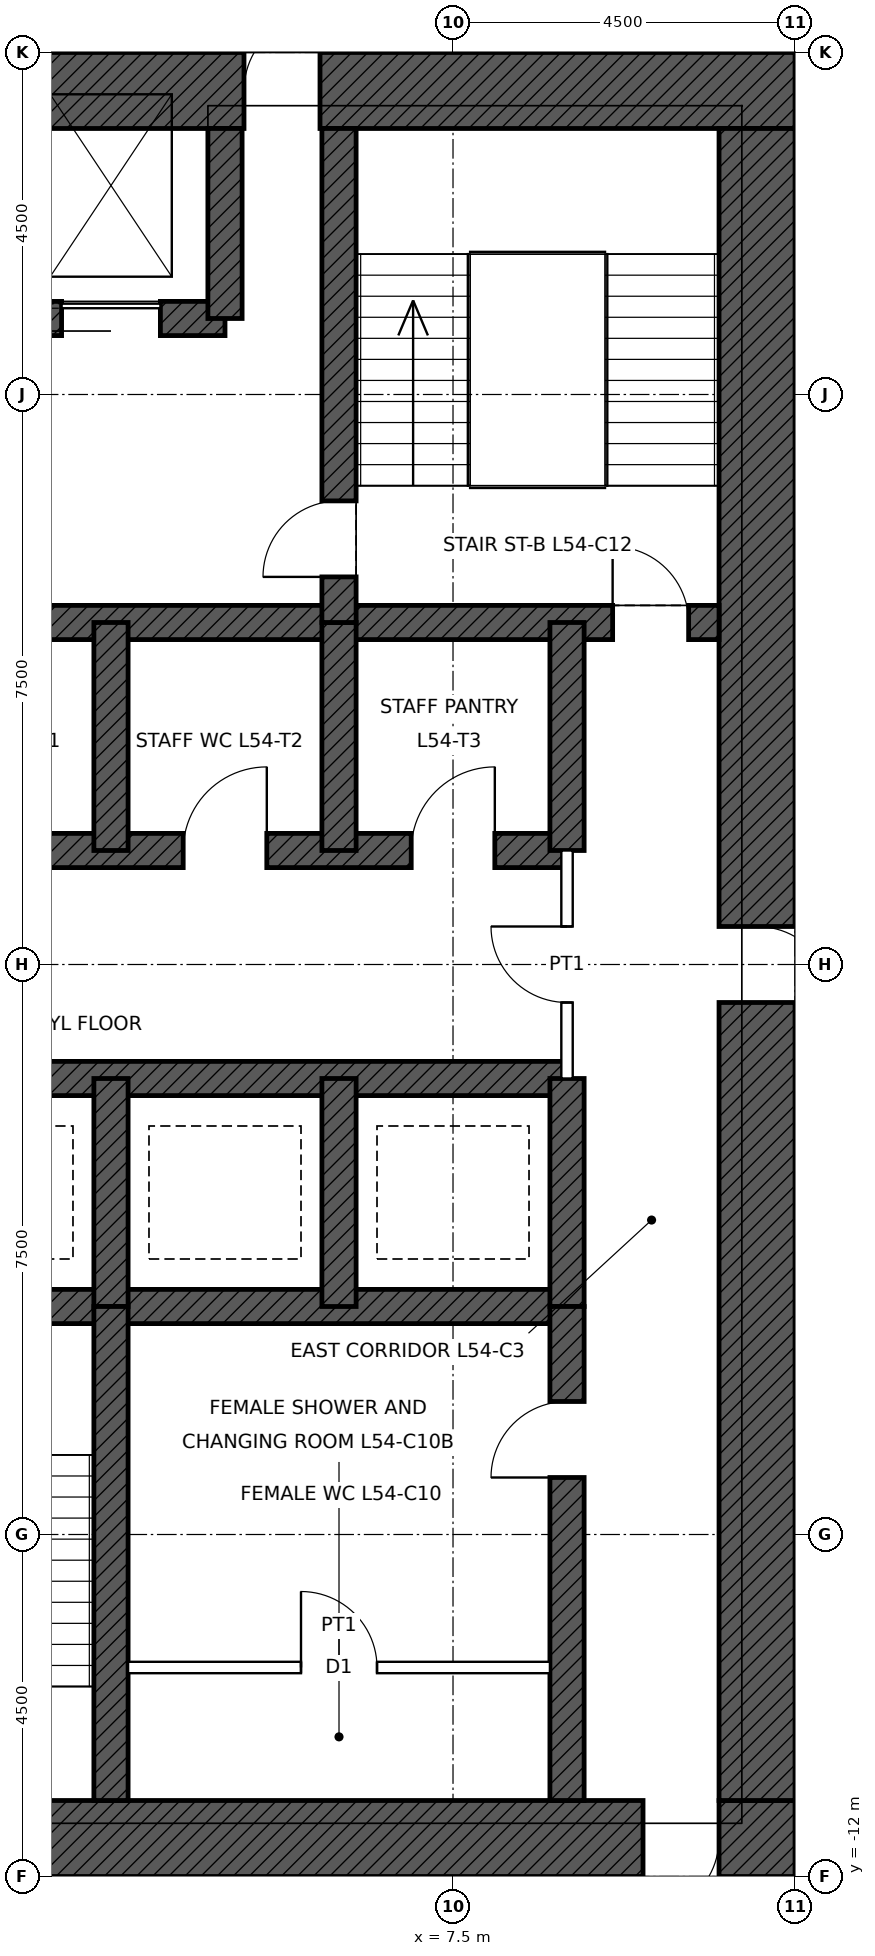
"""IFC4 building model, lengths in metres.
Left out: names, types, materials, properties, quantities, classifications, styles, units other than length and angle.
Written with IfcOpenShell. Run it as: python <this file> out.ifc"""

import sys

from ifc_helpers import new_model, si_unit, direction, frame, frame_2d, origin, place, context, subcontext, project, spatial, rectangle, extrude, element, fill, save


model = new_model("IFC4")
c1 = context("Model", 3, precision=1e-05, world=origin(), true_north=direction((0.0, 1.0)))
c2 = subcontext(c1, "Body", "Model", "MODEL_VIEW")
j1 = project(units=[si_unit("LENGTHUNIT", "METRE"), si_unit("PLANEANGLEUNIT", "RADIAN")], contexts=[c1])
p1 = place(None, origin())
s1 = spatial("IfcSite", under=j1, at=p1, CompositionType="ELEMENT")
p2 = place(p1, origin())
s2 = spatial("IfcBuilding", under=s1, at=p2, CompositionType="ELEMENT")
p3 = place(p2, frame((0.0, 0.0, 249.9)))
s3 = spatial("IfcBuildingStorey", under=s2, at=p3, CompositionType="ELEMENT", Elevation=249.9)
p4 = place(p3, frame((-12.0, 11.5, 0.0), z_axis=(0.0, 0.0, 1.0), x_axis=(1.0, 0.0, 0.0)))
e1 = element("IfcWall", 1, at=p4, inside=s3, PredefinedType="SHEAR", context=c2, shape_type="SweptSolid", body=[
    extrude(rectangle(XDim=24.0, YDim=1.0, at=frame_2d((12.0, 0.0))), origin(), (0.0, 0.0, 1.0), 4.0),
])
p5 = place(p4, frame((6.25, 0.0, 0.0)))
e2 = element("IfcOpeningElement", 2, at=p5, cuts=e1, PredefinedType="OPENING", context=c2, shape_type="SweptSolid", body=[
    extrude(rectangle(XDim=1.0, YDim=2.4, at=frame_2d((0.5, 1.2))), frame((0.0, 0.51, 0.0), z_axis=(0.0, -1.0, 0.0), x_axis=(1.0, 0.0, 0.0)), (0.0, 0.0, 1.0), 1.02),
])
p6 = place(p4, frame((16.75, 0.0, 0.0)))
e3 = element("IfcOpeningElement", 3, at=p6, cuts=e1, PredefinedType="OPENING", context=c2, shape_type="SweptSolid", body=[
    extrude(rectangle(XDim=1.0, YDim=2.4, at=frame_2d((0.5, 1.2))), frame((0.0, 0.51, 0.0), z_axis=(0.0, -1.0, 0.0), x_axis=(1.0, 0.0, 0.0)), (0.0, 0.0, 1.0), 1.02),
])
p7 = place(p3, frame((12.0, -11.5, 0.0), z_axis=(0.0, 0.0, 1.0), x_axis=(-1.0, 0.0, 0.0)))
e4 = element("IfcWall", 4, at=p7, inside=s3, PredefinedType="SHEAR", context=c2, shape_type="SweptSolid", body=[
    extrude(rectangle(XDim=24.0, YDim=1.0, at=frame_2d((12.0, 0.0))), origin(), (0.0, 0.0, 1.0), 4.0),
])
p8 = place(p7, frame((11.5, 0.0, 0.0)))
e5 = element("IfcOpeningElement", 5, at=p8, cuts=e4, PredefinedType="OPENING", context=c2, shape_type="SweptSolid", body=[
    extrude(rectangle(XDim=1.0, YDim=2.1, at=frame_2d((0.5, 1.05))), frame((0.0, 0.51, 0.0), z_axis=(0.0, -1.0, 0.0), x_axis=(1.0, 0.0, 0.0)), (0.0, 0.0, 1.0), 1.02),
])
p9 = place(p7, frame((1.0, 0.0, 0.0)))
e6 = element("IfcOpeningElement", 6, at=p9, cuts=e4, PredefinedType="OPENING", context=c2, shape_type="SweptSolid", body=[
    extrude(rectangle(XDim=1.0, YDim=2.4, at=frame_2d((0.5, 1.2))), frame((0.0, 0.51, 0.0), z_axis=(0.0, -1.0, 0.0), x_axis=(1.0, 0.0, 0.0)), (0.0, 0.0, 1.0), 1.02),
])
p10 = place(p3, frame((11.5, 11.0, 0.0), z_axis=(0.0, 0.0, 1.0), x_axis=(0.0, -1.0, 0.0)))
e7 = element("IfcWall", 7, at=p10, inside=s3, PredefinedType="SHEAR", context=c2, shape_type="SweptSolid", body=[
    extrude(rectangle(XDim=22.0, YDim=1.0, at=frame_2d((11.0, 0.0))), origin(), (0.0, 0.0, 1.0), 4.0),
])
p11 = place(p10, frame((10.5, 0.0, 0.0)))
e8 = element("IfcOpeningElement", 8, at=p11, cuts=e7, PredefinedType="OPENING", context=c2, shape_type="SweptSolid", body=[
    extrude(rectangle(XDim=1.0, YDim=2.4, at=frame_2d((0.5, 1.2))), frame((0.0, 0.51, 0.0), z_axis=(0.0, -1.0, 0.0), x_axis=(1.0, 0.0, 0.0)), (0.0, 0.0, 1.0), 1.02),
])
p12 = place(p3, frame((-11.0, 4.5, 0.0), z_axis=(0.0, 0.0, 1.0), x_axis=(1.0, 0.0, 0.0)))
e9 = element("IfcWall", 9, at=p12, inside=s3, PredefinedType="SHEAR", context=c2, shape_type="SweptSolid", body=[
    extrude(rectangle(XDim=22.0, YDim=0.45, at=frame_2d((11.0, 0.0))), origin(), (0.0, 0.0, 1.0), 4.0),
])
p13 = place(p12, frame((0.4, 0.0, 0.0)))
e10 = element("IfcOpeningElement", 10, at=p13, cuts=e9, PredefinedType="OPENING", context=c2, shape_type="SweptSolid", body=[
    extrude(rectangle(XDim=1.0, YDim=2.1, at=frame_2d((0.5, 1.05))), frame((0.0, 0.235, 0.0), z_axis=(0.0, -1.0, 0.0), x_axis=(1.0, 0.0, 0.0)), (0.0, 0.0, 1.0), 0.47),
])
p14 = place(p12, frame((20.6, 0.0, 0.0)))
e11 = element("IfcOpeningElement", 11, at=p14, cuts=e9, PredefinedType="OPENING", context=c2, shape_type="SweptSolid", body=[
    extrude(rectangle(XDim=1.0, YDim=2.1, at=frame_2d((0.5, 1.05))), frame((0.0, 0.235, 0.0), z_axis=(0.0, -1.0, 0.0), x_axis=(1.0, 0.0, 0.0)), (0.0, 0.0, 1.0), 0.47),
])
p15 = place(p3, frame((-9.0, 1.5, 0.0), z_axis=(0.0, 0.0, 1.0), x_axis=(1.0, 0.0, 0.0)))
e12 = element("IfcWall", 12, at=p15, inside=s3, PredefinedType="SHEAR", context=c2, shape_type="SweptSolid", body=[
    extrude(rectangle(XDim=18.0, YDim=0.45, at=frame_2d((9.0, 0.0))), origin(), (0.0, 0.0, 1.0), 4.0),
])
p16 = place(p15, frame((0.95, 0.0, 0.0)))
e13 = element("IfcOpeningElement", 13, at=p16, cuts=e12, PredefinedType="OPENING", context=c2, shape_type="SweptSolid", body=[
    extrude(rectangle(XDim=1.1, YDim=2.1, at=frame_2d((0.55, 1.05))), frame((0.0, 0.235, 0.0), z_axis=(0.0, -1.0, 0.0), x_axis=(1.0, 0.0, 0.0)), (0.0, 0.0, 1.0), 0.47),
])
p17 = place(p15, frame((3.95, 0.0, 0.0)))
e14 = element("IfcOpeningElement", 14, at=p17, cuts=e12, PredefinedType="OPENING", context=c2, shape_type="SweptSolid", body=[
    extrude(rectangle(XDim=1.1, YDim=2.1, at=frame_2d((0.55, 1.05))), frame((0.0, 0.235, 0.0), z_axis=(0.0, -1.0, 0.0), x_axis=(1.0, 0.0, 0.0)), (0.0, 0.0, 1.0), 0.47),
])
p18 = place(p15, frame((6.95, 0.0, 0.0)))
e15 = element("IfcOpeningElement", 15, at=p18, cuts=e12, PredefinedType="OPENING", context=c2, shape_type="SweptSolid", body=[
    extrude(rectangle(XDim=1.1, YDim=2.1, at=frame_2d((0.55, 1.05))), frame((0.0, 0.235, 0.0), z_axis=(0.0, -1.0, 0.0), x_axis=(1.0, 0.0, 0.0)), (0.0, 0.0, 1.0), 0.47),
])
p19 = place(p15, frame((9.95, 0.0, 0.0)))
e16 = element("IfcOpeningElement", 16, at=p19, cuts=e12, PredefinedType="OPENING", context=c2, shape_type="SweptSolid", body=[
    extrude(rectangle(XDim=1.1, YDim=2.1, at=frame_2d((0.55, 1.05))), frame((0.0, 0.235, 0.0), z_axis=(0.0, -1.0, 0.0), x_axis=(1.0, 0.0, 0.0)), (0.0, 0.0, 1.0), 0.47),
])
p20 = place(p15, frame((12.95, 0.0, 0.0)))
e17 = element("IfcOpeningElement", 17, at=p20, cuts=e12, PredefinedType="OPENING", context=c2, shape_type="SweptSolid", body=[
    extrude(rectangle(XDim=1.1, YDim=2.1, at=frame_2d((0.55, 1.05))), frame((0.0, 0.235, 0.0), z_axis=(0.0, -1.0, 0.0), x_axis=(1.0, 0.0, 0.0)), (0.0, 0.0, 1.0), 0.47),
])
p21 = place(p15, frame((15.95, 0.0, 0.0)))
e18 = element("IfcOpeningElement", 18, at=p21, cuts=e12, PredefinedType="OPENING", context=c2, shape_type="SweptSolid", body=[
    extrude(rectangle(XDim=1.1, YDim=2.1, at=frame_2d((0.55, 1.05))), frame((0.0, 0.235, 0.0), z_axis=(0.0, -1.0, 0.0), x_axis=(1.0, 0.0, 0.0)), (0.0, 0.0, 1.0), 0.47),
])
p22 = place(p3, frame((-9.0, -1.5, 0.0), z_axis=(0.0, 0.0, 1.0), x_axis=(1.0, 0.0, 0.0)))
e19 = element("IfcWall", 19, at=p22, inside=s3, PredefinedType="SHEAR", context=c2, shape_type="SweptSolid", body=[
    extrude(rectangle(XDim=18.0, YDim=0.45, at=frame_2d((9.0, 0.0))), origin(), (0.0, 0.0, 1.0), 4.0),
])
p23 = place(p22, frame((0.95, 0.0, 0.0)))
e20 = element("IfcOpeningElement", 20, at=p23, cuts=e19, PredefinedType="OPENING", context=c2, shape_type="SweptSolid", body=[
    extrude(rectangle(XDim=1.1, YDim=2.1, at=frame_2d((0.55, 1.05))), frame((0.0, 0.235, 0.0), z_axis=(0.0, -1.0, 0.0), x_axis=(1.0, 0.0, 0.0)), (0.0, 0.0, 1.0), 0.47),
])
p24 = place(p22, frame((3.95, 0.0, 0.0)))
e21 = element("IfcOpeningElement", 21, at=p24, cuts=e19, PredefinedType="OPENING", context=c2, shape_type="SweptSolid", body=[
    extrude(rectangle(XDim=1.1, YDim=2.1, at=frame_2d((0.55, 1.05))), frame((0.0, 0.235, 0.0), z_axis=(0.0, -1.0, 0.0), x_axis=(1.0, 0.0, 0.0)), (0.0, 0.0, 1.0), 0.47),
])
p25 = place(p22, frame((6.95, 0.0, 0.0)))
e22 = element("IfcOpeningElement", 22, at=p25, cuts=e19, PredefinedType="OPENING", context=c2, shape_type="SweptSolid", body=[
    extrude(rectangle(XDim=1.1, YDim=2.1, at=frame_2d((0.55, 1.05))), frame((0.0, 0.235, 0.0), z_axis=(0.0, -1.0, 0.0), x_axis=(1.0, 0.0, 0.0)), (0.0, 0.0, 1.0), 0.47),
])
p26 = place(p3, frame((-9.0, -4.5, 0.0), z_axis=(0.0, 0.0, 1.0), x_axis=(1.0, 0.0, 0.0)))
e23 = element("IfcWall", 23, at=p26, inside=s3, PredefinedType="SHEAR", context=c2, shape_type="SweptSolid", body=[
    extrude(rectangle(XDim=18.0, YDim=0.45, at=frame_2d((9.0, 0.0))), origin(), (0.0, 0.0, 1.0), 4.0),
])
p27 = place(p3, frame((-4.5, 8.5, 0.0), z_axis=(0.0, 0.0, 1.0), x_axis=(1.0, 0.0, 0.0)))
e24 = element("IfcWall", 24, at=p27, inside=s3, PredefinedType="SHEAR", context=c2, shape_type="SweptSolid", body=[
    extrude(rectangle(XDim=9.0, YDim=0.45, at=frame_2d((4.5, 0.0))), origin(), (0.0, 0.0, 1.0), 4.0),
])
p28 = place(p27, frame((0.85, 0.0, 0.0)))
e25 = element("IfcOpeningElement", 25, at=p28, cuts=e24, PredefinedType="OPENING", context=c2, shape_type="SweptSolid", body=[
    extrude(rectangle(XDim=1.3, YDim=2.4, at=frame_2d((0.65, 1.2))), frame((0.0, 0.235, 0.0), z_axis=(0.0, -1.0, 0.0), x_axis=(1.0, 0.0, 0.0)), (0.0, 0.0, 1.0), 0.47),
])
p29 = place(p27, frame((6.85, 0.0, 0.0)))
e26 = element("IfcOpeningElement", 26, at=p29, cuts=e24, PredefinedType="OPENING", context=c2, shape_type="SweptSolid", body=[
    extrude(rectangle(XDim=1.3, YDim=2.4, at=frame_2d((0.65, 1.2))), frame((0.0, 0.235, 0.0), z_axis=(0.0, -1.0, 0.0), x_axis=(1.0, 0.0, 0.0)), (0.0, 0.0, 1.0), 0.47),
])
p30 = place(p27, frame((3.85, 0.0, 0.0)))
e27 = element("IfcOpeningElement", 27, at=p30, cuts=e24, PredefinedType="OPENING", context=c2, shape_type="SweptSolid", body=[
    extrude(rectangle(XDim=1.3, YDim=2.4, at=frame_2d((0.65, 1.2))), frame((0.0, 0.235, 0.0), z_axis=(0.0, -1.0, 0.0), x_axis=(1.0, 0.0, 0.0)), (0.0, 0.0, 1.0), 0.47),
])
for number, where, z_axis, x_axis in (
    (28, (9.0, 1.5, 0.0), (0.0, 0.0, 1.0), (0.0, 1.0, 0.0)),
    (29, (9.0, -4.5, 0.0), (0.0, 0.0, 1.0), (0.0, 1.0, 0.0)),
    (30, (3.0, 1.5, 0.0), (0.0, 0.0, 1.0), (0.0, 1.0, 0.0)),
    (31, (6.0, 1.5, 0.0), (0.0, 0.0, 1.0), (0.0, 1.0, 0.0)),
    (32, (3.0, -4.5, 0.0), (0.0, 0.0, 1.0), (0.0, 1.0, 0.0)),
    (33, (6.0, -4.5, 0.0), (0.0, 0.0, 1.0), (0.0, 1.0, 0.0)),
):
    element("IfcWall", number, at=place(p3, frame(where, z_axis=z_axis, x_axis=x_axis)), inside=s3, PredefinedType="SHEAR", context=c2, shape_type="SweptSolid", body=[
        extrude(rectangle(XDim=3.0, YDim=0.45, at=frame_2d((1.5, 0.0))), origin(), (0.0, 0.0, 1.0), 4.0),
    ])
p31 = place(p3, frame((6.0, 4.5, 0.0), z_axis=(0.0, 0.0, 1.0), x_axis=(0.0, 1.0, 0.0)))
e34 = element("IfcWall", 34, at=p31, inside=s3, PredefinedType="SHEAR", context=c2, shape_type="SweptSolid", body=[
    extrude(rectangle(XDim=6.5, YDim=0.45, at=frame_2d((3.25, 0.0))), origin(), (0.0, 0.0, 1.0), 4.0),
])
p32 = place(p31, frame((0.6, 0.0, 0.0)))
e35 = element("IfcOpeningElement", 35, at=p32, cuts=e34, PredefinedType="OPENING", context=c2, shape_type="SweptSolid", body=[
    extrude(rectangle(XDim=1.0, YDim=2.1, at=frame_2d((0.5, 1.05))), frame((0.0, 0.235, 0.0), z_axis=(0.0, -1.0, 0.0), x_axis=(1.0, 0.0, 0.0)), (0.0, 0.0, 1.0), 0.47),
])
p33 = place(p3, frame((4.5, 8.5, 0.0), z_axis=(0.0, 0.0, 1.0), x_axis=(0.0, 1.0, 0.0)))
e36 = element("IfcWall", 36, at=p33, inside=s3, PredefinedType="SHEAR", context=c2, shape_type="SweptSolid", body=[
    extrude(rectangle(XDim=2.5, YDim=0.45, at=frame_2d((1.25, 0.0))), origin(), (0.0, 0.0, 1.0), 4.0),
])
p34 = place(p3, frame((9.0, -11.0, 0.0), z_axis=(0.0, 0.0, 1.0), x_axis=(0.0, 1.0, 0.0)))
e37 = element("IfcWall", 37, at=p34, inside=s3, PredefinedType="SHEAR", context=c2, shape_type="SweptSolid", body=[
    extrude(rectangle(XDim=6.5, YDim=0.45, at=frame_2d((3.25, 0.0))), origin(), (0.0, 0.0, 1.0), 4.0),
])
p35 = place(p34, frame((4.25, 0.0, 0.0)))
e38 = element("IfcOpeningElement", 38, at=p35, cuts=e37, PredefinedType="OPENING", context=c2, shape_type="SweptSolid", body=[
    extrude(rectangle(XDim=1.0, YDim=2.1, at=frame_2d((0.5, 1.05))), frame((0.0, 0.235, 0.0), z_axis=(0.0, -1.0, 0.0), x_axis=(1.0, 0.0, 0.0)), (0.0, 0.0, 1.0), 0.47),
])
p36 = place(p3, frame((3.0, -11.0, 0.0), z_axis=(0.0, 0.0, 1.0), x_axis=(0.0, 1.0, 0.0)))
e39 = element("IfcWall", 39, at=p36, inside=s3, PredefinedType="SHEAR", context=c2, shape_type="SweptSolid", body=[
    extrude(rectangle(XDim=6.5, YDim=0.45, at=frame_2d((3.25, 0.0))), origin(), (0.0, 0.0, 1.0), 4.0),
])
p37 = place(p3, frame((3.225, -9.25, 0.0), z_axis=(0.0, 0.0, 1.0), x_axis=(1.0, 0.0, 0.0)))
e40 = element("IfcWall", 40, at=p37, inside=s3, PredefinedType="PARTITIONING", context=c2, shape_type="SweptSolid", body=[
    extrude(rectangle(XDim=5.55, YDim=0.15, at=frame_2d((2.775, 0.0))), origin(), (0.0, 0.0, 1.0), 3.75),
])
p38 = place(p37, frame((2.275, 0.0, 0.0)))
e41 = element("IfcOpeningElement", 41, at=p38, cuts=e40, PredefinedType="OPENING", context=c2, shape_type="SweptSolid", body=[
    extrude(rectangle(XDim=1.0, YDim=2.1, at=frame_2d((0.5, 1.05))), frame((0.0, 0.085, 0.0), z_axis=(0.0, -1.0, 0.0), x_axis=(1.0, 0.0, 0.0)), (0.0, 0.0, 1.0), 0.17),
])
p39 = place(p3, frame((9.0, -1.5, 0.0), z_axis=(0.0, 0.0, 1.0), x_axis=(0.0, 1.0, 0.0)))
e42 = element("IfcWall", 42, at=p39, inside=s3, PredefinedType="PARTITIONING", context=c2, shape_type="SweptSolid", body=[
    extrude(rectangle(XDim=3.0, YDim=0.15, at=frame_2d((1.5, 0.0))), origin(), (0.0, 0.0, 1.0), 3.75),
])
p40 = place(p39, frame((1.0, 0.0, 0.0)))
e43 = element("IfcOpeningElement", 43, at=p40, cuts=e42, PredefinedType="OPENING", context=c2, shape_type="SweptSolid", body=[
    extrude(rectangle(XDim=1.0, YDim=2.4, at=frame_2d((0.5, 1.2))), frame((0.0, 0.085, 0.0), z_axis=(0.0, -1.0, 0.0), x_axis=(1.0, 0.0, 0.0)), (0.0, 0.0, 1.0), 0.17),
])
p41 = place(p14, origin())
e44 = element("IfcDoor", 44, at=p41, inside=s3, OperationType="SINGLE_SWING_LEFT", PredefinedType="DOOR", context=c2, shape_type="SweptSolid", body=[
    extrude(rectangle(XDim=1.0, YDim=2.1, at=frame_2d((0.5, 1.05))), frame((0.0, 0.025, 0.0), z_axis=(0.0, -1.0, 0.0), x_axis=(1.0, 0.0, 0.0)), (0.0, 0.0, 1.0), 0.05),
])
fill(e11, e44)
p42 = place(p32, origin())
e45 = element("IfcDoor", 45, at=p42, inside=s3, OperationType="SINGLE_SWING_LEFT", PredefinedType="DOOR", context=c2, shape_type="SweptSolid", body=[
    extrude(rectangle(XDim=1.0, YDim=2.1, at=frame_2d((0.5, 1.05))), frame((0.0, 0.025, 0.0), z_axis=(0.0, -1.0, 0.0), x_axis=(1.0, 0.0, 0.0)), (0.0, 0.0, 1.0), 0.05),
])
fill(e35, e45)
p43 = place(p6, origin())
e46 = element("IfcDoor", 46, at=p43, inside=s3, OperationType="SINGLE_SWING_RIGHT", PredefinedType="DOOR", context=c2, shape_type="SweptSolid", body=[
    extrude(rectangle(XDim=1.0, YDim=2.4, at=frame_2d((0.5, 1.2))), frame((0.0, 0.485, 0.0), z_axis=(0.0, -1.0, 0.0), x_axis=(1.0, 0.0, 0.0)), (0.0, 0.0, 1.0), 0.05),
])
fill(e3, e46)
p44 = place(p11, origin())
e47 = element("IfcDoor", 47, at=p44, inside=s3, OperationType="SINGLE_SWING_RIGHT", PredefinedType="DOOR", context=c2, shape_type="SweptSolid", body=[
    extrude(rectangle(XDim=1.0, YDim=2.4, at=frame_2d((0.5, 1.2))), frame((0.0, 0.485, 0.0), z_axis=(0.0, -1.0, 0.0), x_axis=(1.0, 0.0, 0.0)), (0.0, 0.0, 1.0), 0.05),
])
fill(e8, e47)
p45 = place(p9, origin())
e48 = element("IfcDoor", 48, at=p45, inside=s3, OperationType="SINGLE_SWING_RIGHT", PredefinedType="DOOR", context=c2, shape_type="SweptSolid", body=[
    extrude(rectangle(XDim=1.0, YDim=2.4, at=frame_2d((0.5, 1.2))), frame((0.0, 0.485, 0.0), z_axis=(0.0, -1.0, 0.0), x_axis=(1.0, 0.0, 0.0)), (0.0, 0.0, 1.0), 0.05),
])
fill(e6, e48)
p46 = place(p35, origin())
e49 = element("IfcDoor", 49, at=p46, inside=s3, OperationType="SINGLE_SWING_LEFT", PredefinedType="DOOR", context=c2, shape_type="SweptSolid", body=[
    extrude(rectangle(XDim=1.0, YDim=2.1, at=frame_2d((0.5, 1.05))), frame((0.0, 0.025, 0.0), z_axis=(0.0, -1.0, 0.0), x_axis=(1.0, 0.0, 0.0)), (0.0, 0.0, 1.0), 0.05),
])
fill(e38, e49)
p47 = place(p29, origin())
e50 = element("IfcDoor", 50, at=p47, inside=s3, OperationType="SLIDING_TO_LEFT", PredefinedType="DOOR", context=c2, shape_type="SweptSolid", body=[
    extrude(rectangle(XDim=1.3, YDim=2.4, at=frame_2d((0.65, 1.2))), frame((0.0, 0.025, 0.0), z_axis=(0.0, -1.0, 0.0), x_axis=(1.0, 0.0, 0.0)), (0.0, 0.0, 1.0), 0.05),
])
fill(e26, e50)
p48 = place(p38, origin())
e51 = element("IfcDoor", 51, at=p48, inside=s3, OperationType="SINGLE_SWING_LEFT", PredefinedType="DOOR", context=c2, shape_type="SweptSolid", body=[
    extrude(rectangle(XDim=1.0, YDim=2.1, at=frame_2d((0.5, 1.05))), frame((0.0, 0.025, 0.0), z_axis=(0.0, -1.0, 0.0), x_axis=(1.0, 0.0, 0.0)), (0.0, 0.0, 1.0), 0.05),
])
fill(e41, e51)
p49 = place(p40, origin())
e52 = element("IfcDoor", 52, at=p49, inside=s3, OperationType="SINGLE_SWING_RIGHT", PredefinedType="DOOR", context=c2, shape_type="SweptSolid", body=[
    extrude(rectangle(XDim=1.0, YDim=2.4, at=frame_2d((0.5, 1.2))), frame((0.0, 0.025, 0.0), z_axis=(0.0, -1.0, 0.0), x_axis=(1.0, 0.0, 0.0)), (0.0, 0.0, 1.0), 0.05),
])
fill(e43, e52)
p50 = place(p20, origin())
e53 = element("IfcDoor", 53, at=p50, inside=s3, OperationType="SINGLE_SWING_RIGHT", PredefinedType="DOOR", context=c2, shape_type="SweptSolid", body=[
    extrude(rectangle(XDim=1.1, YDim=2.1, at=frame_2d((0.55, 1.05))), frame((0.0, 0.025, 0.0), z_axis=(0.0, -1.0, 0.0), x_axis=(1.0, 0.0, 0.0)), (0.0, 0.0, 1.0), 0.05),
])
fill(e17, e53)
p51 = place(p21, origin())
e54 = element("IfcDoor", 54, at=p51, inside=s3, OperationType="SINGLE_SWING_RIGHT", PredefinedType="DOOR", context=c2, shape_type="SweptSolid", body=[
    extrude(rectangle(XDim=1.1, YDim=2.1, at=frame_2d((0.55, 1.05))), frame((0.0, 0.025, 0.0), z_axis=(0.0, -1.0, 0.0), x_axis=(1.0, 0.0, 0.0)), (0.0, 0.0, 1.0), 0.05),
])
fill(e18, e54)
save(model, sys.argv[1])
